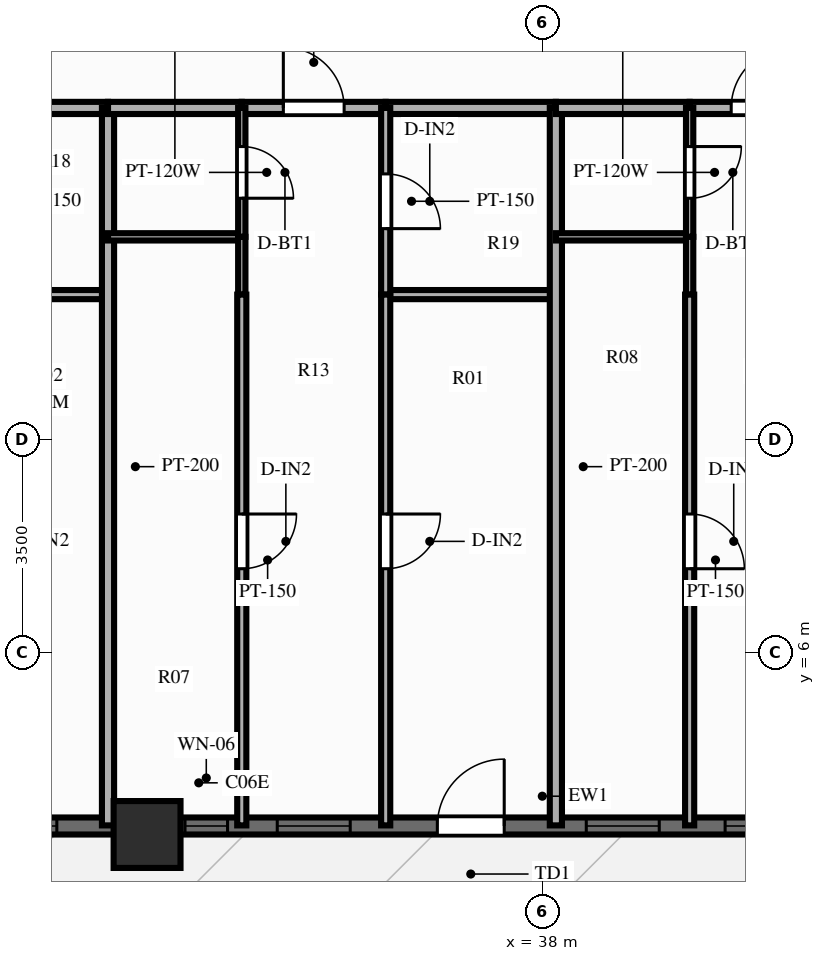
"""IFC4 building model, lengths in metres.
Left out: names, types, materials, properties, quantities, classifications, styles, units other than length and angle.
Written with IfcOpenShell. Run it as: python <this file> out.ifc"""

import sys

from ifc_helpers import new_model, si_unit, direction, frame, frame_2d, origin, origin_2d, place, context, subcontext, project, spatial, rectangle, extrude, source, transform, mapped, element, fill, save


model = new_model("IFC4")
c1 = context("Model", 3, precision=1e-05, world=origin(), true_north=direction((0.0, 1.0)))
c2 = subcontext(c1, "Body", "Model", "MODEL_VIEW")
j1 = project(units=[si_unit("LENGTHUNIT", "METRE"), si_unit("PLANEANGLEUNIT", "RADIAN")], contexts=[c1])
p1 = place(None, origin())
s1 = spatial("IfcSite", under=j1, at=p1, CompositionType="ELEMENT")
p2 = place(p1, origin())
s2 = spatial("IfcBuilding", under=s1, at=p2, CompositionType="ELEMENT")
p3 = place(p2, frame((0.0, 0.0, 22.4)))
s3 = spatial("IfcBuildingStorey", under=s2, at=p3, CompositionType="ELEMENT", Elevation=22.4)
m1 = source(origin(), c2, "Body", "SweptSolid", [
    extrude(rectangle(XDim=1.1, YDim=1.1, at=origin_2d()), origin(), (0.0, 0.0, 1.0), 3.0),
])
p4 = place(p3, frame((31.5, 3.0, 0.0), z_axis=(0.0, 0.0, 1.0), x_axis=(1.0, 0.0, 0.0)))
e1 = element("IfcColumn", 1, at=p4, inside=s3, PredefinedType="COLUMN", context=c2, shape_type="MappedRepresentation", body=[
    mapped(m1, transform((0.0, 0.0, 0.0), scale=1.0)),
])
p5 = place(p3, frame((15.5, 3.14, 0.0), z_axis=(0.0, 0.0, 1.0), x_axis=(1.0, 0.0, 0.0)))
e2 = element("IfcWall", 2, at=p5, inside=s3, PredefinedType="SOLIDWALL", context=c2, shape_type="SweptSolid", body=[
    extrude(rectangle(XDim=45.0, YDim=0.28, at=frame_2d((22.5, 0.0))), origin(), (0.0, 0.0, 1.0), 2.28),
])
p6 = place(p5, frame((0.785, 0.0, 0.25)))
e3 = element("IfcOpeningElement", 3, at=p6, cuts=e2, PredefinedType="OPENING", context=c2, shape_type="SweptSolid", body=[
    extrude(rectangle(XDim=1.2, YDim=1.5, at=frame_2d((0.6, 0.75))), frame((0.0, 0.152, 0.0), z_axis=(0.0, -1.0, 0.0), x_axis=(1.0, 0.0, 0.0)), (0.0, 0.0, 1.0), 0.304),
])
p7 = place(p5, frame((3.033, 0.0, 0.25)))
e4 = element("IfcOpeningElement", 4, at=p7, cuts=e2, PredefinedType="OPENING", context=c2, shape_type="SweptSolid", body=[
    extrude(rectangle(XDim=1.2, YDim=1.5, at=frame_2d((0.6, 0.75))), frame((0.0, 0.152, 0.0), z_axis=(0.0, -1.0, 0.0), x_axis=(1.0, 0.0, 0.0)), (0.0, 0.0, 1.0), 0.304),
])
p8 = place(p5, frame((5.727, 0.0, 0.25)))
e5 = element("IfcOpeningElement", 5, at=p8, cuts=e2, PredefinedType="OPENING", context=c2, shape_type="SweptSolid", body=[
    extrude(rectangle(XDim=1.2, YDim=1.5, at=frame_2d((0.6, 0.75))), frame((0.0, 0.152, 0.0), z_axis=(0.0, -1.0, 0.0), x_axis=(1.0, 0.0, 0.0)), (0.0, 0.0, 1.0), 0.304),
])
p9 = place(p5, frame((8.269, 0.0, 0.25)))
e6 = element("IfcOpeningElement", 6, at=p9, cuts=e2, PredefinedType="OPENING", context=c2, shape_type="SweptSolid", body=[
    extrude(rectangle(XDim=1.2, YDim=1.5, at=frame_2d((0.6, 0.75))), frame((0.0, 0.152, 0.0), z_axis=(0.0, -1.0, 0.0), x_axis=(1.0, 0.0, 0.0)), (0.0, 0.0, 1.0), 0.304),
])
p10 = place(p5, frame((10.621, 0.0, 0.25)))
e7 = element("IfcOpeningElement", 7, at=p10, cuts=e2, PredefinedType="OPENING", context=c2, shape_type="SweptSolid", body=[
    extrude(rectangle(XDim=1.2, YDim=1.5, at=frame_2d((0.6, 0.75))), frame((0.0, 0.152, 0.0), z_axis=(0.0, -1.0, 0.0), x_axis=(1.0, 0.0, 0.0)), (0.0, 0.0, 1.0), 0.304),
])
p11 = place(p5, frame((13.316, 0.0, 0.25)))
e8 = element("IfcOpeningElement", 8, at=p11, cuts=e2, PredefinedType="OPENING", context=c2, shape_type="SweptSolid", body=[
    extrude(rectangle(XDim=1.2, YDim=1.5, at=frame_2d((0.6, 0.75))), frame((0.0, 0.152, 0.0), z_axis=(0.0, -1.0, 0.0), x_axis=(1.0, 0.0, 0.0)), (0.0, 0.0, 1.0), 0.304),
])
p12 = place(p5, frame((16.624, 0.0, 0.25)))
e9 = element("IfcOpeningElement", 9, at=p12, cuts=e2, PredefinedType="OPENING", context=c2, shape_type="SweptSolid", body=[
    extrude(rectangle(XDim=0.7, YDim=1.5, at=frame_2d((0.35, 0.75))), frame((0.0, 0.152, 0.0), z_axis=(0.0, -1.0, 0.0), x_axis=(1.0, 0.0, 0.0)), (0.0, 0.0, 1.0), 0.304),
])
p13 = place(p5, frame((18.141, 0.0, 0.25)))
e10 = element("IfcOpeningElement", 10, at=p13, cuts=e2, PredefinedType="OPENING", context=c2, shape_type="SweptSolid", body=[
    extrude(rectangle(XDim=1.2, YDim=1.5, at=frame_2d((0.6, 0.75))), frame((0.0, 0.152, 0.0), z_axis=(0.0, -1.0, 0.0), x_axis=(1.0, 0.0, 0.0)), (0.0, 0.0, 1.0), 0.304),
])
p14 = place(p5, frame((21.874, 0.0, 0.0), z_axis=(0.0, 0.0, 1.0), x_axis=(-1.0, 0.0, 0.0)))
e11 = element("IfcOpeningElement", 11, at=p14, cuts=e2, PredefinedType="OPENING", context=c2, shape_type="SweptSolid", body=[
    extrude(rectangle(XDim=1.1, YDim=2.15, at=frame_2d((0.55, 1.075))), frame((0.0, 0.152, 0.0), z_axis=(0.0, -1.0, 0.0), x_axis=(1.0, 0.0, 0.0)), (0.0, 0.0, 1.0), 0.304),
])
p15 = place(p5, frame((23.223, 0.0, 0.25)))
e12 = element("IfcOpeningElement", 12, at=p15, cuts=e2, PredefinedType="OPENING", context=c2, shape_type="SweptSolid", body=[
    extrude(rectangle(XDim=1.2, YDim=1.5, at=frame_2d((0.6, 0.75))), frame((0.0, 0.152, 0.0), z_axis=(0.0, -1.0, 0.0), x_axis=(1.0, 0.0, 0.0)), (0.0, 0.0, 1.0), 0.304),
])
p16 = place(p5, frame((25.507, 0.0, 0.25)))
e13 = element("IfcOpeningElement", 13, at=p16, cuts=e2, PredefinedType="OPENING", context=c2, shape_type="SweptSolid", body=[
    extrude(rectangle(XDim=1.2, YDim=1.5, at=frame_2d((0.6, 0.75))), frame((0.0, 0.152, 0.0), z_axis=(0.0, -1.0, 0.0), x_axis=(1.0, 0.0, 0.0)), (0.0, 0.0, 1.0), 0.304),
])
p17 = place(p5, frame((27.6, 0.0, 0.25)))
e14 = element("IfcOpeningElement", 14, at=p17, cuts=e2, PredefinedType="OPENING", context=c2, shape_type="SweptSolid", body=[
    extrude(rectangle(XDim=0.7, YDim=1.5, at=frame_2d((0.35, 0.75))), frame((0.0, 0.152, 0.0), z_axis=(0.0, -1.0, 0.0), x_axis=(1.0, 0.0, 0.0)), (0.0, 0.0, 1.0), 0.304),
])
p18 = place(p5, frame((30.589, 0.0, 0.25)))
e15 = element("IfcOpeningElement", 15, at=p18, cuts=e2, PredefinedType="OPENING", context=c2, shape_type="SweptSolid", body=[
    extrude(rectangle(XDim=1.2, YDim=1.5, at=frame_2d((0.6, 0.75))), frame((0.0, 0.152, 0.0), z_axis=(0.0, -1.0, 0.0), x_axis=(1.0, 0.0, 0.0)), (0.0, 0.0, 1.0), 0.304),
])
p19 = place(p5, frame((32.872, 0.0, 0.25)))
e16 = element("IfcOpeningElement", 16, at=p19, cuts=e2, PredefinedType="OPENING", context=c2, shape_type="SweptSolid", body=[
    extrude(rectangle(XDim=1.2, YDim=1.5, at=frame_2d((0.6, 0.75))), frame((0.0, 0.152, 0.0), z_axis=(0.0, -1.0, 0.0), x_axis=(1.0, 0.0, 0.0)), (0.0, 0.0, 1.0), 0.304),
])
p20 = place(p5, frame((35.455, 0.0, 0.25)))
e17 = element("IfcOpeningElement", 17, at=p20, cuts=e2, PredefinedType="OPENING", context=c2, shape_type="SweptSolid", body=[
    extrude(rectangle(XDim=1.2, YDim=1.5, at=frame_2d((0.6, 0.75))), frame((0.0, 0.152, 0.0), z_axis=(0.0, -1.0, 0.0), x_axis=(1.0, 0.0, 0.0)), (0.0, 0.0, 1.0), 0.304),
])
p21 = place(p5, frame((37.954, 0.0, 0.25)))
e18 = element("IfcOpeningElement", 18, at=p21, cuts=e2, PredefinedType="OPENING", context=c2, shape_type="SweptSolid", body=[
    extrude(rectangle(XDim=1.2, YDim=1.5, at=frame_2d((0.6, 0.75))), frame((0.0, 0.152, 0.0), z_axis=(0.0, -1.0, 0.0), x_axis=(1.0, 0.0, 0.0)), (0.0, 0.0, 1.0), 0.304),
])
p22 = place(p5, frame((40.238, 0.0, 0.25)))
e19 = element("IfcOpeningElement", 19, at=p22, cuts=e2, PredefinedType="OPENING", context=c2, shape_type="SweptSolid", body=[
    extrude(rectangle(XDim=1.2, YDim=1.5, at=frame_2d((0.6, 0.75))), frame((0.0, 0.152, 0.0), z_axis=(0.0, -1.0, 0.0), x_axis=(1.0, 0.0, 0.0)), (0.0, 0.0, 1.0), 0.304),
])
p23 = place(p5, frame((42.716, 0.0, 0.25)))
e20 = element("IfcOpeningElement", 20, at=p23, cuts=e2, PredefinedType="OPENING", context=c2, shape_type="SweptSolid", body=[
    extrude(rectangle(XDim=1.2, YDim=1.5, at=frame_2d((0.6, 0.75))), frame((0.0, 0.152, 0.0), z_axis=(0.0, -1.0, 0.0), x_axis=(1.0, 0.0, 0.0)), (0.0, 0.0, 1.0), 0.304),
])
p24 = place(p3, frame((27.974, 14.95, 0.0), z_axis=(0.0, 0.0, 1.0), x_axis=(1.0, 0.0, 0.0)))
e21 = element("IfcWall", 21, at=p24, inside=s3, PredefinedType="PARTITIONING", context=c2, shape_type="SweptSolid", body=[
    extrude(rectangle(XDim=2.884, YDim=0.2, at=frame_2d((1.442, 0.0))), origin(), (0.0, 0.0, 1.0), 2.79),
])
p25 = place(p3, frame((27.974, 11.88, 0.0), z_axis=(0.0, 0.0, 1.0), x_axis=(1.0, 0.0, 0.0)))
e22 = element("IfcWall", 22, at=p25, inside=s3, PredefinedType="PARTITIONING", context=c2, shape_type="SweptSolid", body=[
    extrude(rectangle(XDim=2.884, YDim=0.15, at=frame_2d((1.442, 0.0))), origin(), (0.0, 0.0, 1.0), 2.79),
])
p26 = place(p3, frame((30.858, 14.95, 0.0), z_axis=(0.0, 0.0, 1.0), x_axis=(0.0, -1.0, 0.0)))
e23 = element("IfcWall", 23, at=p26, inside=s3, PredefinedType="PARTITIONING", context=c2, shape_type="SweptSolid", body=[
    extrude(rectangle(XDim=11.8, YDim=0.2, at=frame_2d((5.9, 0.0))), origin(), (0.0, 0.0, 1.0), 2.24),
])
p27 = place(p3, frame((30.858, 14.95, 0.0), z_axis=(0.0, 0.0, 1.0), x_axis=(1.0, 0.0, 0.0)))
e24 = element("IfcWall", 24, at=p27, inside=s3, PredefinedType="PARTITIONING", context=c2, shape_type="SweptSolid", body=[
    extrude(rectangle(XDim=2.2, YDim=0.2, at=frame_2d((1.1, 0.0))), origin(), (0.0, 0.0, 1.0), 2.79),
])
p28 = place(p3, frame((33.058, 14.95, 0.0), z_axis=(0.0, 0.0, 1.0), x_axis=(1.0, 0.0, 0.0)))
e25 = element("IfcWall", 25, at=p28, inside=s3, PredefinedType="PARTITIONING", context=c2, shape_type="SweptSolid", body=[
    extrude(rectangle(XDim=2.367, YDim=0.2, at=frame_2d((1.183, 0.0))), origin(), (0.0, 0.0, 1.0), 2.79),
])
p29 = place(p28, frame((0.683, 0.0, 0.0)))
e26 = element("IfcOpeningElement", 26, at=p29, cuts=e25, PredefinedType="OPENING", context=c2, shape_type="SweptSolid", body=[
    extrude(rectangle(XDim=1.0, YDim=2.15, at=frame_2d((0.5, 1.075))), frame((0.0, 0.112, 0.0), z_axis=(0.0, -1.0, 0.0), x_axis=(1.0, 0.0, 0.0)), (0.0, 0.0, 1.0), 0.224),
])
p30 = place(p3, frame((35.424, 14.95, 0.0), z_axis=(0.0, 0.0, 1.0), x_axis=(1.0, 0.0, 0.0)))
e27 = element("IfcWall", 27, at=p30, inside=s3, PredefinedType="PARTITIONING", context=c2, shape_type="SweptSolid", body=[
    extrude(rectangle(XDim=2.799, YDim=0.2, at=frame_2d((1.399, 0.0))), origin(), (0.0, 0.0, 1.0), 2.79),
])
p31 = place(p3, frame((30.858, 12.83, 0.0), z_axis=(0.0, 0.0, 1.0), x_axis=(1.0, 0.0, 0.0)))
e28 = element("IfcWall", 28, at=p31, inside=s3, PredefinedType="PARTITIONING", context=c2, shape_type="SweptSolid", body=[
    extrude(rectangle(XDim=2.2, YDim=0.12, at=frame_2d((1.1, 0.0))), origin(), (0.0, 0.0, 1.0), 2.79),
])
p32 = place(p3, frame((35.424, 11.88, 0.0), z_axis=(0.0, 0.0, 1.0), x_axis=(1.0, 0.0, 0.0)))
e29 = element("IfcWall", 29, at=p32, inside=s3, PredefinedType="PARTITIONING", context=c2, shape_type="SweptSolid", body=[
    extrude(rectangle(XDim=2.799, YDim=0.15, at=frame_2d((1.399, 0.0))), origin(), (0.0, 0.0, 1.0), 2.79),
])
p33 = place(p3, frame((33.058, 14.95, 0.0), z_axis=(0.0, 0.0, 1.0), x_axis=(0.0, -1.0, 0.0)))
e30 = element("IfcWall", 30, at=p33, inside=s3, PredefinedType="PARTITIONING", context=c2, shape_type="SweptSolid", body=[
    extrude(rectangle(XDim=2.12, YDim=0.12, at=frame_2d((1.06, 0.0))), origin(), (0.0, 0.0, 1.0), 2.79),
])
p34 = place(p33, frame((0.635, 0.0, 0.0)))
e31 = element("IfcOpeningElement", 31, at=p34, cuts=e30, PredefinedType="OPENING", context=c2, shape_type="SweptSolid", body=[
    extrude(rectangle(XDim=0.85, YDim=2.05, at=frame_2d((0.425, 1.025))), frame((0.0, 0.072, 0.0), z_axis=(0.0, -1.0, 0.0), x_axis=(1.0, 0.0, 0.0)), (0.0, 0.0, 1.0), 0.144),
])
p35 = place(p3, frame((33.058, 12.83, 0.0), z_axis=(0.0, 0.0, 1.0), x_axis=(0.0, -1.0, 0.0)))
e32 = element("IfcWall", 32, at=p35, inside=s3, PredefinedType="PARTITIONING", context=c2, shape_type="SweptSolid", body=[
    extrude(rectangle(XDim=0.95, YDim=0.12, at=frame_2d((0.475, 0.0))), origin(), (0.0, 0.0, 1.0), 2.79),
])
p36 = place(p3, frame((33.058, 11.88, 0.0), z_axis=(0.0, 0.0, 1.0), x_axis=(0.0, -1.0, 0.0)))
e33 = element("IfcWall", 33, at=p36, inside=s3, PredefinedType="PARTITIONING", context=c2, shape_type="SweptSolid", body=[
    extrude(rectangle(XDim=8.73, YDim=0.15, at=frame_2d((4.365, 0.0))), origin(), (0.0, 0.0, 1.0), 2.79),
])
p37 = place(p36, frame((3.609, 0.0, 0.0)))
e34 = element("IfcOpeningElement", 34, at=p37, cuts=e33, PredefinedType="OPENING", context=c2, shape_type="SweptSolid", body=[
    extrude(rectangle(XDim=0.9, YDim=2.1, at=frame_2d((0.45, 1.05))), frame((0.0, 0.087, 0.0), z_axis=(0.0, -1.0, 0.0), x_axis=(1.0, 0.0, 0.0)), (0.0, 0.0, 1.0), 0.174),
])
p38 = place(p3, frame((35.424, 14.95, 0.0), z_axis=(0.0, 0.0, 1.0), x_axis=(0.0, -1.0, 0.0)))
e35 = element("IfcWall", 35, at=p38, inside=s3, PredefinedType="PARTITIONING", context=c2, shape_type="SweptSolid", body=[
    extrude(rectangle(XDim=3.07, YDim=0.15, at=frame_2d((1.535, 0.0))), origin(), (0.0, 0.0, 1.0), 2.79),
])
p39 = place(p38, frame((1.085, 0.0, 0.0)))
e36 = element("IfcOpeningElement", 36, at=p39, cuts=e35, PredefinedType="OPENING", context=c2, shape_type="SweptSolid", body=[
    extrude(rectangle(XDim=0.9, YDim=2.1, at=frame_2d((0.45, 1.05))), frame((0.0, 0.087, 0.0), z_axis=(0.0, -1.0, 0.0), x_axis=(1.0, 0.0, 0.0)), (0.0, 0.0, 1.0), 0.174),
])
p40 = place(p3, frame((35.424, 11.88, 0.0), z_axis=(0.0, 0.0, 1.0), x_axis=(0.0, -1.0, 0.0)))
e37 = element("IfcWall", 37, at=p40, inside=s3, PredefinedType="PARTITIONING", context=c2, shape_type="SweptSolid", body=[
    extrude(rectangle(XDim=8.73, YDim=0.15, at=frame_2d((4.365, 0.0))), origin(), (0.0, 0.0, 1.0), 2.79),
])
p41 = place(p40, frame((3.609, 0.0, 0.0)))
e38 = element("IfcOpeningElement", 38, at=p41, cuts=e37, PredefinedType="OPENING", context=c2, shape_type="SweptSolid", body=[
    extrude(rectangle(XDim=0.9, YDim=2.1, at=frame_2d((0.45, 1.05))), frame((0.0, 0.087, 0.0), z_axis=(0.0, -1.0, 0.0), x_axis=(1.0, 0.0, 0.0)), (0.0, 0.0, 1.0), 0.174),
])
p42 = place(p3, frame((38.223, 14.95, 0.0), z_axis=(0.0, 0.0, 1.0), x_axis=(0.0, -1.0, 0.0)))
e39 = element("IfcWall", 39, at=p42, inside=s3, PredefinedType="PARTITIONING", context=c2, shape_type="SweptSolid", body=[
    extrude(rectangle(XDim=11.8, YDim=0.2, at=frame_2d((5.9, 0.0))), origin(), (0.0, 0.0, 1.0), 2.79),
])
p43 = place(p3, frame((38.223, 14.95, 0.0), z_axis=(0.0, 0.0, 1.0), x_axis=(1.0, 0.0, 0.0)))
e40 = element("IfcWall", 40, at=p43, inside=s3, PredefinedType="PARTITIONING", context=c2, shape_type="SweptSolid", body=[
    extrude(rectangle(XDim=2.2, YDim=0.2, at=frame_2d((1.1, 0.0))), origin(), (0.0, 0.0, 1.0), 2.79),
])
p44 = place(p3, frame((40.423, 14.95, 0.0), z_axis=(0.0, 0.0, 1.0), x_axis=(1.0, 0.0, 0.0)))
e41 = element("IfcWall", 41, at=p44, inside=s3, PredefinedType="PARTITIONING", context=c2, shape_type="SweptSolid", body=[
    extrude(rectangle(XDim=2.367, YDim=0.2, at=frame_2d((1.183, 0.0))), origin(), (0.0, 0.0, 1.0), 2.79),
])
p45 = place(p44, frame((0.683, 0.0, 0.0)))
e42 = element("IfcOpeningElement", 42, at=p45, cuts=e41, PredefinedType="OPENING", context=c2, shape_type="SweptSolid", body=[
    extrude(rectangle(XDim=1.0, YDim=2.15, at=frame_2d((0.5, 1.075))), frame((0.0, 0.112, 0.0), z_axis=(0.0, -1.0, 0.0), x_axis=(1.0, 0.0, 0.0)), (0.0, 0.0, 1.0), 0.224),
])
p46 = place(p3, frame((38.223, 12.83, 0.0), z_axis=(0.0, 0.0, 1.0), x_axis=(1.0, 0.0, 0.0)))
e43 = element("IfcWall", 43, at=p46, inside=s3, PredefinedType="PARTITIONING", context=c2, shape_type="SweptSolid", body=[
    extrude(rectangle(XDim=2.2, YDim=0.12, at=frame_2d((1.1, 0.0))), origin(), (0.0, 0.0, 1.0), 2.79),
])
p47 = place(p3, frame((40.423, 14.95, 0.0), z_axis=(0.0, 0.0, 1.0), x_axis=(0.0, -1.0, 0.0)))
e44 = element("IfcWall", 44, at=p47, inside=s3, PredefinedType="PARTITIONING", context=c2, shape_type="SweptSolid", body=[
    extrude(rectangle(XDim=2.12, YDim=0.12, at=frame_2d((1.06, 0.0))), origin(), (0.0, 0.0, 1.0), 2.79),
])
p48 = place(p47, frame((0.635, 0.0, 0.0)))
e45 = element("IfcOpeningElement", 45, at=p48, cuts=e44, PredefinedType="OPENING", context=c2, shape_type="SweptSolid", body=[
    extrude(rectangle(XDim=0.85, YDim=2.05, at=frame_2d((0.425, 1.025))), frame((0.0, 0.072, 0.0), z_axis=(0.0, -1.0, 0.0), x_axis=(1.0, 0.0, 0.0)), (0.0, 0.0, 1.0), 0.144),
])
p49 = place(p3, frame((40.423, 12.83, 0.0), z_axis=(0.0, 0.0, 1.0), x_axis=(0.0, -1.0, 0.0)))
e46 = element("IfcWall", 46, at=p49, inside=s3, PredefinedType="PARTITIONING", context=c2, shape_type="SweptSolid", body=[
    extrude(rectangle(XDim=0.95, YDim=0.12, at=frame_2d((0.475, 0.0))), origin(), (0.0, 0.0, 1.0), 2.79),
])
p50 = place(p3, frame((40.423, 11.88, 0.0), z_axis=(0.0, 0.0, 1.0), x_axis=(0.0, -1.0, 0.0)))
e47 = element("IfcWall", 47, at=p50, inside=s3, PredefinedType="PARTITIONING", context=c2, shape_type="SweptSolid", body=[
    extrude(rectangle(XDim=8.73, YDim=0.15, at=frame_2d((4.365, 0.0))), origin(), (0.0, 0.0, 1.0), 2.79),
])
p51 = place(p50, frame((3.609, 0.0, 0.0)))
e48 = element("IfcOpeningElement", 48, at=p51, cuts=e47, PredefinedType="OPENING", context=c2, shape_type="SweptSolid", body=[
    extrude(rectangle(XDim=0.9, YDim=2.1, at=frame_2d((0.45, 1.05))), frame((0.0, 0.087, 0.0), z_axis=(0.0, -1.0, 0.0), x_axis=(1.0, 0.0, 0.0)), (0.0, 0.0, 1.0), 0.174),
])
m2 = source(origin(), c2, "Body", "SweptSolid", [
    extrude(rectangle(XDim=1.2, YDim=1.5, at=frame_2d((0.6, 0.75))), frame((0.0, 0.03, 0.0), z_axis=(0.0, -1.0, 0.0), x_axis=(1.0, 0.0, 0.0)), (0.0, 0.0, 1.0), 0.06),
])
p52 = place(p11, origin())
e49 = element("IfcWindow", 49, at=p52, inside=s3, PartitioningType="SINGLE_PANEL", PredefinedType="WINDOW", context=c2, shape_type="MappedRepresentation", body=[
    mapped(m2, transform((0.0, 0.0, 0.0), scale=1.0)),
])
fill(e8, e49)
m3 = source(origin(), c2, "Body", "SweptSolid", [
    extrude(rectangle(XDim=0.7, YDim=1.5, at=frame_2d((0.35, 0.75))), frame((0.0, 0.03, 0.0), z_axis=(0.0, -1.0, 0.0), x_axis=(1.0, 0.0, 0.0)), (0.0, 0.0, 1.0), 0.06),
])
p53 = place(p12, origin())
e50 = element("IfcWindow", 50, at=p53, inside=s3, PartitioningType="SINGLE_PANEL", PredefinedType="WINDOW", context=c2, shape_type="MappedRepresentation", body=[
    mapped(m3, transform((0.0, 0.0, 0.0), scale=1.0)),
])
fill(e9, e50)
p54 = place(p13, origin())
e51 = element("IfcWindow", 51, at=p54, inside=s3, PartitioningType="SINGLE_PANEL", PredefinedType="WINDOW", context=c2, shape_type="MappedRepresentation", body=[
    mapped(m2, transform((0.0, 0.0, 0.0), scale=1.0)),
])
fill(e10, e51)
m4 = source(origin(), c2, "Body", "SweptSolid", [
    extrude(rectangle(XDim=1.1, YDim=2.15, at=frame_2d((0.55, 1.075))), frame((0.0, 0.025, 0.0), z_axis=(0.0, -1.0, 0.0), x_axis=(1.0, 0.0, 0.0)), (0.0, 0.0, 1.0), 0.05),
])
p55 = place(p14, origin())
e52 = element("IfcDoor", 52, at=p55, inside=s3, OperationType="SINGLE_SWING_LEFT", PredefinedType="DOOR", context=c2, shape_type="MappedRepresentation", body=[
    mapped(m4, transform((0.0, 0.0, 0.0), scale=1.0)),
])
fill(e11, e52)
p56 = place(p15, origin())
e53 = element("IfcWindow", 53, at=p56, inside=s3, PartitioningType="SINGLE_PANEL", PredefinedType="WINDOW", context=c2, shape_type="MappedRepresentation", body=[
    mapped(m2, transform((0.0, 0.0, 0.0), scale=1.0)),
])
fill(e12, e53)
p57 = place(p16, origin())
e54 = element("IfcWindow", 54, at=p57, inside=s3, PartitioningType="SINGLE_PANEL", PredefinedType="WINDOW", context=c2, shape_type="MappedRepresentation", body=[
    mapped(m2, transform((0.0, 0.0, 0.0), scale=1.0)),
])
fill(e13, e54)
m5 = source(origin(), c2, "Body", "SweptSolid", [
    extrude(rectangle(XDim=1.0, YDim=2.15, at=frame_2d((0.5, 1.075))), frame((0.0, 0.025, 0.0), z_axis=(0.0, -1.0, 0.0), x_axis=(1.0, 0.0, 0.0)), (0.0, 0.0, 1.0), 0.05),
])
p58 = place(p29, origin())
e55 = element("IfcDoor", 55, at=p58, inside=s3, OperationType="SINGLE_SWING_LEFT", PredefinedType="DOOR", context=c2, shape_type="MappedRepresentation", body=[
    mapped(m5, transform((0.0, 0.0, 0.0), scale=1.0)),
])
fill(e26, e55)
m6 = source(origin(), c2, "Body", "SweptSolid", [
    extrude(rectangle(XDim=0.85, YDim=2.05, at=frame_2d((0.425, 1.025))), frame((0.0, 0.025, 0.0), z_axis=(0.0, -1.0, 0.0), x_axis=(1.0, 0.0, 0.0)), (0.0, 0.0, 1.0), 0.05),
])
p59 = place(p34, origin())
e56 = element("IfcDoor", 56, at=p59, inside=s3, OperationType="SINGLE_SWING_RIGHT", PredefinedType="DOOR", context=c2, shape_type="MappedRepresentation", body=[
    mapped(m6, transform((0.0, 0.0, 0.0), scale=1.0)),
])
fill(e31, e56)
m7 = source(origin(), c2, "Body", "SweptSolid", [
    extrude(rectangle(XDim=0.9, YDim=2.1, at=frame_2d((0.45, 1.05))), frame((0.0, 0.025, 0.0), z_axis=(0.0, -1.0, 0.0), x_axis=(1.0, 0.0, 0.0)), (0.0, 0.0, 1.0), 0.05),
])
p60 = place(p37, origin())
e57 = element("IfcDoor", 57, at=p60, inside=s3, OperationType="SINGLE_SWING_LEFT", PredefinedType="DOOR", context=c2, shape_type="MappedRepresentation", body=[
    mapped(m7, transform((0.0, 0.0, 0.0), scale=1.0)),
])
fill(e34, e57)
p61 = place(p39, origin())
e58 = element("IfcDoor", 58, at=p61, inside=s3, OperationType="SINGLE_SWING_RIGHT", PredefinedType="DOOR", context=c2, shape_type="MappedRepresentation", body=[
    mapped(m7, transform((0.0, 0.0, 0.0), scale=1.0)),
])
fill(e36, e58)
p62 = place(p41, origin())
e59 = element("IfcDoor", 59, at=p62, inside=s3, OperationType="SINGLE_SWING_LEFT", PredefinedType="DOOR", context=c2, shape_type="MappedRepresentation", body=[
    mapped(m7, transform((0.0, 0.0, 0.0), scale=1.0)),
])
fill(e38, e59)
p63 = place(p45, origin())
e60 = element("IfcDoor", 60, at=p63, inside=s3, OperationType="SINGLE_SWING_RIGHT", PredefinedType="DOOR", context=c2, shape_type="MappedRepresentation", body=[
    mapped(m5, transform((0.0, 0.0, 0.0), scale=1.0)),
])
fill(e42, e60)
p64 = place(p48, origin())
e61 = element("IfcDoor", 61, at=p64, inside=s3, OperationType="SINGLE_SWING_LEFT", PredefinedType="DOOR", context=c2, shape_type="MappedRepresentation", body=[
    mapped(m6, transform((0.0, 0.0, 0.0), scale=1.0)),
])
fill(e45, e61)
p65 = place(p51, origin())
e62 = element("IfcDoor", 62, at=p65, inside=s3, OperationType="SINGLE_SWING_RIGHT", PredefinedType="DOOR", context=c2, shape_type="MappedRepresentation", body=[
    mapped(m7, transform((0.0, 0.0, 0.0), scale=1.0)),
])
fill(e48, e62)
save(model, sys.argv[1])
